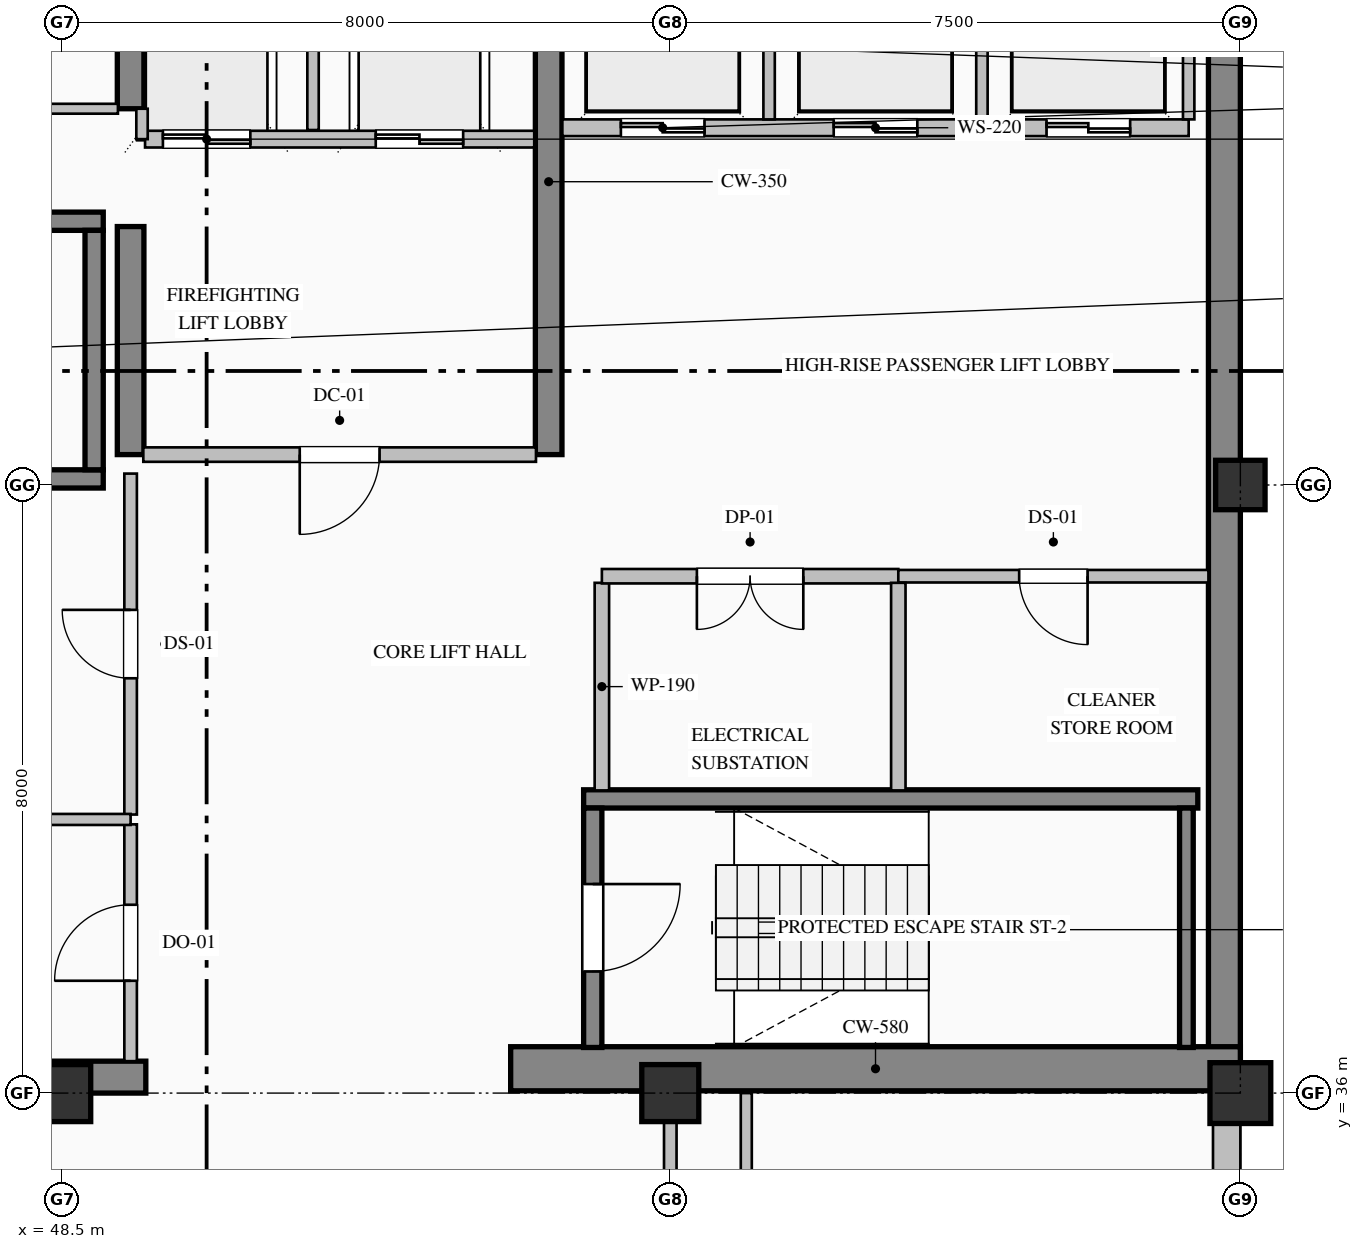
"""IFC4 building model, lengths in metres.
Left out: names, types, materials, properties, quantities, classifications, styles, units other than length and angle.
Written with IfcOpenShell. Run it as: python <this file> out.ifc"""

import sys

from ifc_helpers import new_model, si_unit, direction, frame, frame_2d, origin, origin_2d, place, context, subcontext, project, spatial, rectangle, hollow_rectangle, extrude, element, fill, save


model = new_model("IFC4")
c1 = context("Model", 3, precision=1e-05, world=origin(), true_north=direction((0.0, 1.0)))
c2 = subcontext(c1, "Body", "Model", "MODEL_VIEW")
j1 = project(units=[si_unit("LENGTHUNIT", "METRE"), si_unit("PLANEANGLEUNIT", "RADIAN")], contexts=[c1])
p1 = place(None, origin())
s1 = spatial("IfcSite", under=j1, at=p1, CompositionType="ELEMENT")
p2 = place(p1, origin())
s2 = spatial("IfcBuilding", under=s1, at=p2, CompositionType="ELEMENT")
p3 = place(p2, frame((0.0, 0.0, 331.2)))
s3 = spatial("IfcBuildingStorey", under=s2, at=p3, CompositionType="ELEMENT", Elevation=331.2)
p4 = place(p3, frame((63.79, 36.32, 0.0), z_axis=(0.0, 0.0, 1.0), x_axis=(0.0, 1.0, 0.0)))
e1 = element("IfcWall", 1, at=p4, inside=s3, PredefinedType="SHEAR", context=c2, shape_type="SweptSolid", body=[
    extrude(rectangle(XDim=15.26, YDim=0.42, at=frame_2d((7.63, 0.0))), origin(), (0.0, 0.0, 1.0), 3.785),
])
p5 = place(p3, frame((40.5, 36.21, 0.0), z_axis=(0.0, 0.0, 1.0), x_axis=(1.0, 0.0, 0.0)))
e2 = element("IfcWall", 2, at=p5, inside=s3, PredefinedType="SHEAR", context=c2, shape_type="SweptSolid", body=[
    extrude(rectangle(XDim=9.1, YDim=0.42, at=frame_2d((4.55, 0.0))), origin(), (0.0, 0.0, 1.0), 3.785),
])
p6 = place(p3, frame((54.4, 36.32, 0.0), z_axis=(0.0, 0.0, 1.0), x_axis=(1.0, 0.0, 0.0)))
e3 = element("IfcWall", 3, at=p6, inside=s3, PredefinedType="SHEAR", context=c2, shape_type="SweptSolid", body=[
    extrude(rectangle(XDim=9.6, YDim=0.58, at=frame_2d((4.8, 0.0))), origin(), (0.0, 0.0, 1.0), 4.0),
])
p7 = place(p3, frame((49.4, 44.4, 0.0), z_axis=(0.0, 0.0, 1.0), x_axis=(0.0, 1.0, 0.0)))
e4 = element("IfcWall", 4, at=p7, inside=s3, PredefinedType="SHEAR", context=c2, shape_type="SweptSolid", body=[
    extrude(rectangle(XDim=3.0, YDim=0.35, at=frame_2d((1.5, 0.0))), origin(), (0.0, 0.0, 1.0), 3.785),
])
p8 = place(p3, frame((49.4, 48.95, 0.0), z_axis=(0.0, 0.0, 1.0), x_axis=(0.0, 1.0, 0.0)))
e5 = element("IfcWall", 5, at=p8, inside=s3, PredefinedType="SHEAR", context=c2, shape_type="SweptSolid", body=[
    extrude(rectangle(XDim=2.63, YDim=0.35, at=frame_2d((1.315, 0.0))), origin(), (0.0, 0.0, 1.0), 3.785),
])
p9 = place(p3, frame((54.9, 44.4, 0.0), z_axis=(0.0, 0.0, 1.0), x_axis=(0.0, 1.0, 0.0)))
e6 = element("IfcWall", 6, at=p9, inside=s3, PredefinedType="SHEAR", context=c2, shape_type="SweptSolid", body=[
    extrude(rectangle(XDim=7.18, YDim=0.35, at=frame_2d((3.59, 0.0))), origin(), (0.0, 0.0, 1.0), 3.785),
])
for number, where, z_axis, x_axis in (
    (7, (48.5, 36.0, 0.0), (0.0, 0.0, 1.0), (1.0, 0.0, 0.0)),
    (8, (56.5, 36.0, 0.0), (0.0, 0.0, 1.0), (1.0, 0.0, 0.0)),
):
    element("IfcColumn", number, at=place(p3, frame(where, z_axis=z_axis, x_axis=x_axis)), inside=s3, PredefinedType="COLUMN", context=c2, shape_type="SweptSolid", body=[
        extrude(rectangle(XDim=0.75, YDim=0.75, at=origin_2d()), origin(), (0.0, 0.0, 1.0), 4.0),
    ])
p10 = place(p3, frame((64.0, 36.0, 0.0), z_axis=(0.0, 0.0, 1.0), x_axis=(1.0, 0.0, 0.0)))
e9 = element("IfcColumn", 9, at=p10, inside=s3, PredefinedType="COLUMN", context=c2, shape_type="SweptSolid", body=[
    extrude(hollow_rectangle(XDim=0.8, YDim=0.8, WallThickness=0.032, at=origin_2d()), origin(), (0.0, 0.0, 1.0), 4.0),
])
p11 = place(p3, frame((64.0, 44.0, 0.0), z_axis=(0.0, 0.0, 1.0), x_axis=(1.0, 0.0, 0.0)))
e10 = element("IfcColumn", 10, at=p11, inside=s3, PredefinedType="COLUMN", context=c2, shape_type="SweptSolid", body=[
    extrude(hollow_rectangle(XDim=0.65, YDim=0.65, WallThickness=0.028, at=origin_2d()), origin(), (0.0, 0.0, 1.0), 4.0),
])
p12 = place(p3, frame((63.82, 36.05, 0.0), z_axis=(0.0, 0.0, 1.0), x_axis=(0.0, -1.0, 0.0)))
e11 = element("IfcWall", 11, at=p12, inside=s3, PredefinedType="SOLIDWALL", context=c2, shape_type="SweptSolid", body=[
    extrude(rectangle(XDim=13.55, YDim=0.36, at=frame_2d((6.775, 0.0))), origin(), (0.0, 0.0, 1.0), 3.335),
])
p13 = place(p12, frame((2.925, 0.0, 0.9)))
e12 = element("IfcOpeningElement", 12, at=p13, cuts=e11, PredefinedType="OPENING", context=c2, shape_type="SweptSolid", body=[
    extrude(rectangle(XDim=1.35, YDim=1.85, at=frame_2d((0.675, 0.925))), frame((0.0, 0.19, 0.0), z_axis=(0.0, -1.0, 0.0), x_axis=(1.0, 0.0, 0.0)), (0.0, 0.0, 1.0), 0.38),
])
for number, where, z_axis, x_axis in (
    (13, (40.96, 47.47, 0.0), (0.0, 0.0, 1.0), (1.0, 0.0, 0.0)),
    (14, (49.04, 44.08, 0.0), (0.0, 0.0, 1.0), (-1.0, 0.0, 0.0)),
):
    element("IfcWall", number, at=place(p3, frame(where, z_axis=z_axis, x_axis=x_axis)), inside=s3, PredefinedType="SOLIDWALL", context=c2, shape_type="SweptSolid", body=[
        extrude(rectangle(XDim=8.08, YDim=0.24, at=frame_2d((4.04, 0.0))), origin(), (0.0, 0.0, 1.0), 4.0),
    ])
p14 = place(p3, frame((48.92, 44.2, 0.0), z_axis=(0.0, 0.0, 1.0), x_axis=(0.0, 1.0, 0.0)))
e15 = element("IfcWall", 15, at=p14, inside=s3, PredefinedType="SOLIDWALL", context=c2, shape_type="SweptSolid", body=[
    extrude(rectangle(XDim=3.15, YDim=0.24, at=frame_2d((1.575, 0.0))), origin(), (0.0, 0.0, 1.0), 4.0),
])
p15 = place(p3, frame((55.36, 39.87, 0.0), z_axis=(0.0, 0.0, 1.0), x_axis=(1.0, 0.0, 0.0)))
e16 = element("IfcWall", 16, at=p15, inside=s3, PredefinedType="SOLIDWALL", context=c2, shape_type="SweptSolid", body=[
    extrude(rectangle(XDim=8.08, YDim=0.24, at=frame_2d((4.04, 0.0))), origin(), (0.0, 0.0, 1.0), 4.0),
])
p16 = place(p3, frame((55.48, 39.75, 0.0), z_axis=(0.0, 0.0, 1.0), x_axis=(0.0, -1.0, 0.0)))
e17 = element("IfcWall", 17, at=p16, inside=s3, PredefinedType="SOLIDWALL", context=c2, shape_type="SweptSolid", body=[
    extrude(rectangle(XDim=3.15, YDim=0.24, at=frame_2d((1.575, 0.0))), origin(), (0.0, 0.0, 1.0), 4.0),
])
p17 = place(p16, frame((1.0, 0.0, 0.0)))
e18 = element("IfcOpeningElement", 18, at=p17, cuts=e17, PredefinedType="OPENING", context=c2, shape_type="SweptSolid", body=[
    extrude(rectangle(XDim=1.15, YDim=2.2, at=frame_2d((0.575, 1.1))), frame((0.0, 0.13, 0.0), z_axis=(0.0, -1.0, 0.0), x_axis=(1.0, 0.0, 0.0)), (0.0, 0.0, 1.0), 0.26),
])
p18 = place(p3, frame((63.29, 36.6, 0.0), z_axis=(0.0, 0.0, 1.0), x_axis=(0.0, 1.0, 0.0)))
e19 = element("IfcWall", 19, at=p18, inside=s3, PredefinedType="SOLIDWALL", context=c2, shape_type="SweptSolid", body=[
    extrude(rectangle(XDim=3.15, YDim=0.18, at=frame_2d((1.575, 0.0))), origin(), (0.0, 0.0, 1.0), 4.0),
])
p19 = place(p3, frame((54.71, 48.55, 0.0), z_axis=(0.0, 0.0, 1.0), x_axis=(-1.0, 0.0, 0.0)))
e20 = element("IfcWall", 20, at=p19, inside=s3, PredefinedType="PARTITIONING", context=c2, shape_type="SweptSolid", body=[
    extrude(rectangle(XDim=5.12, YDim=0.22, at=frame_2d((2.56, 0.0))), origin(), (0.0, 0.0, 1.0), 3.785),
])
p20 = place(p19, frame((3.735, 0.0, 0.0)))
e21 = element("IfcOpeningElement", 21, at=p20, cuts=e20, PredefinedType="OPENING", context=c2, shape_type="SweptSolid", body=[
    extrude(rectangle(XDim=1.15, YDim=2.2, at=frame_2d((0.575, 1.1))), frame((0.0, 0.12, 0.0), z_axis=(0.0, -1.0, 0.0), x_axis=(1.0, 0.0, 0.0)), (0.0, 0.0, 1.0), 0.24),
])
p21 = place(p19, frame((0.935, 0.0, 0.0)))
e22 = element("IfcOpeningElement", 22, at=p21, cuts=e20, PredefinedType="OPENING", context=c2, shape_type="SweptSolid", body=[
    extrude(rectangle(XDim=1.15, YDim=2.2, at=frame_2d((0.575, 1.1))), frame((0.0, 0.12, 0.0), z_axis=(0.0, -1.0, 0.0), x_axis=(1.0, 0.0, 0.0)), (0.0, 0.0, 1.0), 0.24),
])
p22 = place(p3, frame((51.8, 48.67, 0.0), z_axis=(0.0, 0.0, 1.0), x_axis=(0.0, 1.0, 0.0)))
e23 = element("IfcWall", 23, at=p22, inside=s3, PredefinedType="PARTITIONING", context=c2, shape_type="SweptSolid", body=[
    extrude(rectangle(XDim=2.91, YDim=0.15, at=frame_2d((1.455, 0.0))), origin(), (0.0, 0.0, 1.0), 3.785),
])
p23 = place(p3, frame((49.55, 48.55, 0.0), z_axis=(0.0, 0.0, 1.0), x_axis=(0.0, 1.0, 0.0)))
e24 = element("IfcWall", 24, at=p23, inside=s3, PredefinedType="PARTITIONING", context=c2, shape_type="SweptSolid", body=[
    extrude(rectangle(XDim=0.4, YDim=0.15, at=frame_2d((0.2, 0.0))), origin(), (0.0, 0.0, 1.0), 3.785),
])
p24 = place(p3, frame((63.32, 48.7, 0.0), z_axis=(0.0, 0.0, 1.0), x_axis=(-1.0, 0.0, 0.0)))
e25 = element("IfcWall", 25, at=p24, inside=s3, PredefinedType="PARTITIONING", context=c2, shape_type="SweptSolid", body=[
    extrude(rectangle(XDim=8.24, YDim=0.22, at=frame_2d((4.12, 0.0))), origin(), (0.0, 0.0, 1.0), 3.785),
])
p25 = place(p24, frame((6.37, 0.0, 0.0)))
e26 = element("IfcOpeningElement", 26, at=p25, cuts=e25, PredefinedType="OPENING", context=c2, shape_type="SweptSolid", body=[
    extrude(rectangle(XDim=1.1, YDim=2.2, at=frame_2d((0.55, 1.1))), frame((0.0, 0.12, 0.0), z_axis=(0.0, -1.0, 0.0), x_axis=(1.0, 0.0, 0.0)), (0.0, 0.0, 1.0), 0.24),
])
p26 = place(p24, frame((3.57, 0.0, 0.0)))
e27 = element("IfcOpeningElement", 27, at=p26, cuts=e25, PredefinedType="OPENING", context=c2, shape_type="SweptSolid", body=[
    extrude(rectangle(XDim=1.1, YDim=2.2, at=frame_2d((0.55, 1.1))), frame((0.0, 0.12, 0.0), z_axis=(0.0, -1.0, 0.0), x_axis=(1.0, 0.0, 0.0)), (0.0, 0.0, 1.0), 0.24),
])
p27 = place(p24, frame((0.77, 0.0, 0.0)))
e28 = element("IfcOpeningElement", 28, at=p27, cuts=e25, PredefinedType="OPENING", context=c2, shape_type="SweptSolid", body=[
    extrude(rectangle(XDim=1.1, YDim=2.2, at=frame_2d((0.55, 1.1))), frame((0.0, 0.12, 0.0), z_axis=(0.0, -1.0, 0.0), x_axis=(1.0, 0.0, 0.0)), (0.0, 0.0, 1.0), 0.24),
])
for number, where, z_axis, x_axis in (
    (29, (57.8, 48.81, 0.0), (0.0, 0.0, 1.0), (0.0, 1.0, 0.0)),
    (30, (60.6, 48.81, 0.0), (0.0, 0.0, 1.0), (0.0, 1.0, 0.0)),
    (31, (63.32, 48.81, 0.0), (0.0, 0.0, 1.0), (0.0, 1.0, 0.0)),
):
    element("IfcWall", number, at=place(p3, frame(where, z_axis=z_axis, x_axis=x_axis)), inside=s3, PredefinedType="PARTITIONING", context=c2, shape_type="SweptSolid", body=[
        extrude(rectangle(XDim=2.77, YDim=0.15, at=frame_2d((1.385, 0.0))), origin(), (0.0, 0.0, 1.0), 3.785),
    ])
p28 = place(p3, frame((45.2, 48.95, 0.0), z_axis=(0.0, 0.0, 1.0), x_axis=(1.0, 0.0, 0.0)))
e32 = element("IfcWall", 32, at=p28, inside=s3, PredefinedType="PARTITIONING", context=c2, shape_type="SweptSolid", body=[
    extrude(rectangle(XDim=4.033, YDim=0.13, at=frame_2d((2.017, 0.0))), origin(), (0.0, 0.0, 1.0), 3.785),
])
p29 = place(p28, frame((1.556, 0.0, 0.0)))
e33 = element("IfcOpeningElement", 33, at=p29, cuts=e32, PredefinedType="OPENING", context=c2, shape_type="SweptSolid", body=[
    extrude(rectangle(XDim=0.92, YDim=2.15, at=frame_2d((0.46, 1.075))), frame((0.0, 0.075, 0.0), z_axis=(0.0, -1.0, 0.0), x_axis=(1.0, 0.0, 0.0)), (0.0, 0.0, 1.0), 0.15),
])
p30 = place(p3, frame((54.733, 44.4, 0.0), z_axis=(0.0, 0.0, 1.0), x_axis=(-1.0, 0.0, 0.0)))
e34 = element("IfcWall", 34, at=p30, inside=s3, PredefinedType="PARTITIONING", context=c2, shape_type="SweptSolid", body=[
    extrude(rectangle(XDim=5.166, YDim=0.19, at=frame_2d((2.583, 0.0))), origin(), (0.0, 0.0, 1.0), 3.785),
])
p31 = place(p30, frame((2.058, 0.0, 0.0)))
e35 = element("IfcOpeningElement", 35, at=p31, cuts=e34, PredefinedType="OPENING", context=c2, shape_type="SweptSolid", body=[
    extrude(rectangle(XDim=1.05, YDim=2.15, at=frame_2d((0.525, 1.075))), frame((0.0, 0.105, 0.0), z_axis=(0.0, -1.0, 0.0), x_axis=(1.0, 0.0, 0.0)), (0.0, 0.0, 1.0), 0.21),
])
p32 = place(p3, frame((49.4, 36.42, 0.0), z_axis=(0.0, 0.0, 1.0), x_axis=(0.0, 1.0, 0.0)))
e36 = element("IfcWall", 36, at=p32, inside=s3, PredefinedType="PARTITIONING", context=c2, shape_type="SweptSolid", body=[
    extrude(rectangle(XDim=3.115, YDim=0.165, at=frame_2d((1.558, 0.0))), origin(), (0.0, 0.0, 1.0), 3.027),
])
p33 = place(p32, frame((1.058, 0.0, 0.0)))
e37 = element("IfcOpeningElement", 37, at=p33, cuts=e36, PredefinedType="OPENING", context=c2, shape_type="SweptSolid", body=[
    extrude(rectangle(XDim=1.0, YDim=2.15, at=frame_2d((0.5, 1.075))), frame((0.0, 0.093, 0.0), z_axis=(0.0, -1.0, 0.0), x_axis=(1.0, 0.0, 0.0)), (0.0, 0.0, 1.0), 0.185),
])
p34 = place(p3, frame((49.4, 39.665, 0.0), z_axis=(0.0, 0.0, 1.0), x_axis=(0.0, 1.0, 0.0)))
e38 = element("IfcWall", 38, at=p34, inside=s3, PredefinedType="PARTITIONING", context=c2, shape_type="SweptSolid", body=[
    extrude(rectangle(XDim=4.485, YDim=0.165, at=frame_2d((2.243, 0.0))), origin(), (0.0, 0.0, 1.0), 3.027),
])
p35 = place(p34, frame((1.793, 0.0, 0.0)))
e39 = element("IfcOpeningElement", 39, at=p35, cuts=e38, PredefinedType="OPENING", context=c2, shape_type="SweptSolid", body=[
    extrude(rectangle(XDim=0.9, YDim=2.15, at=frame_2d((0.45, 1.075))), frame((0.0, 0.093, 0.0), z_axis=(0.0, -1.0, 0.0), x_axis=(1.0, 0.0, 0.0)), (0.0, 0.0, 1.0), 0.185),
])
p36 = place(p3, frame((55.6, 42.713, 0.0), z_axis=(0.0, 0.0, 1.0), x_axis=(0.0, -1.0, 0.0)))
e40 = element("IfcWall", 40, at=p36, inside=s3, PredefinedType="PARTITIONING", context=c2, shape_type="SweptSolid", body=[
    extrude(rectangle(XDim=2.731, YDim=0.19, at=frame_2d((1.365, 0.0))), origin(), (0.0, 0.0, 1.0), 3.785),
])
p37 = place(p3, frame((40.92, 39.6, 0.0), z_axis=(0.0, 0.0, 1.0), x_axis=(1.0, 0.0, 0.0)))
e41 = element("IfcWall", 41, at=p37, inside=s3, PredefinedType="PARTITIONING", context=c2, shape_type="SweptSolid", body=[
    extrude(rectangle(XDim=8.48, YDim=0.145, at=frame_2d((4.24, 0.0))), origin(), (0.0, 0.0, 1.0), 3.785),
])
p38 = place(p3, frame((59.5, 42.8, 0.0), z_axis=(0.0, 0.0, 1.0), x_axis=(-1.0, 0.0, 0.0)))
e42 = element("IfcWall", 42, at=p38, inside=s3, PredefinedType="PARTITIONING", context=c2, shape_type="SweptSolid", body=[
    extrude(rectangle(XDim=3.9, YDim=0.19, at=frame_2d((1.95, 0.0))), origin(), (0.0, 0.0, 1.0), 3.785),
])
p39 = place(p38, frame((1.25, 0.0, 0.0)))
e43 = element("IfcOpeningElement", 43, at=p39, cuts=e42, PredefinedType="OPENING", context=c2, shape_type="SweptSolid", body=[
    extrude(rectangle(XDim=1.4, YDim=2.25, at=frame_2d((0.7, 1.125))), frame((0.0, 0.105, 0.0), z_axis=(0.0, -1.0, 0.0), x_axis=(1.0, 0.0, 0.0)), (0.0, 0.0, 1.0), 0.21),
])
p40 = place(p3, frame((63.58, 42.8, 0.0), z_axis=(0.0, 0.0, 1.0), x_axis=(-1.0, 0.0, 0.0)))
e44 = element("IfcWall", 44, at=p40, inside=s3, PredefinedType="PARTITIONING", context=c2, shape_type="SweptSolid", body=[
    extrude(rectangle(XDim=4.08, YDim=0.165, at=frame_2d((2.04, 0.0))), origin(), (0.0, 0.0, 1.0), 3.785),
])
p41 = place(p40, frame((1.59, 0.0, 0.0)))
e45 = element("IfcOpeningElement", 45, at=p41, cuts=e44, PredefinedType="OPENING", context=c2, shape_type="SweptSolid", body=[
    extrude(rectangle(XDim=0.9, YDim=2.15, at=frame_2d((0.45, 1.075))), frame((0.0, 0.093, 0.0), z_axis=(0.0, -1.0, 0.0), x_axis=(1.0, 0.0, 0.0)), (0.0, 0.0, 1.0), 0.185),
])
p42 = place(p3, frame((59.5, 42.713, 0.0), z_axis=(0.0, 0.0, 1.0), x_axis=(0.0, -1.0, 0.0)))
e46 = element("IfcWall", 46, at=p42, inside=s3, PredefinedType="PARTITIONING", context=c2, shape_type="SweptSolid", body=[
    extrude(rectangle(XDim=2.731, YDim=0.19, at=frame_2d((1.365, 0.0))), origin(), (0.0, 0.0, 1.0), 3.785),
])
p43 = place(p3, frame((56.5, 36.0, 0.0), z_axis=(0.0, 0.0, 1.0), x_axis=(0.0, -1.0, 0.0)))
e47 = element("IfcWall", 47, at=p43, inside=s3, PredefinedType="PARTITIONING", context=c2, shape_type="SweptSolid", body=[
    extrude(rectangle(XDim=2.325, YDim=0.165, at=frame_2d((1.163, 0.0))), origin(), (0.0, 0.0, 1.0), 3.177),
])
p44 = place(p3, frame((57.5, 36.0, 0.0), z_axis=(0.0, 0.0, 1.0), x_axis=(0.0, -1.0, 0.0)))
e48 = element("IfcWall", 48, at=p44, inside=s3, PredefinedType="PARTITIONING", context=c2, shape_type="SweptSolid", body=[
    extrude(rectangle(XDim=10.926, YDim=0.145, at=frame_2d((5.463, 0.0))), origin(), (0.0, 0.0, 1.0), 3.785),
])
p45 = place(p17, origin())
e49 = element("IfcDoor", 49, at=p45, inside=s3, OperationType="SINGLE_SWING_LEFT", PredefinedType="DOOR", context=c2, shape_type="SweptSolid", body=[
    extrude(rectangle(XDim=1.15, YDim=2.2, at=frame_2d((0.575, 1.1))), frame((0.0, 0.025, 0.0), z_axis=(0.0, -1.0, 0.0), x_axis=(1.0, 0.0, 0.0)), (0.0, 0.0, 1.0), 0.05),
])
fill(e18, e49)
p46 = place(p20, origin())
e50 = element("IfcDoor", 50, at=p46, inside=s3, OperationType="DOUBLE_DOOR_SLIDING", PredefinedType="DOOR", context=c2, shape_type="SweptSolid", body=[
    extrude(rectangle(XDim=1.15, YDim=2.2, at=frame_2d((0.575, 1.1))), frame((0.0, 0.025, 0.0), z_axis=(0.0, -1.0, 0.0), x_axis=(1.0, 0.0, 0.0)), (0.0, 0.0, 1.0), 0.05),
])
fill(e21, e50)
p47 = place(p21, origin())
e51 = element("IfcDoor", 51, at=p47, inside=s3, OperationType="DOUBLE_DOOR_SLIDING", PredefinedType="DOOR", context=c2, shape_type="SweptSolid", body=[
    extrude(rectangle(XDim=1.15, YDim=2.2, at=frame_2d((0.575, 1.1))), frame((0.0, 0.025, 0.0), z_axis=(0.0, -1.0, 0.0), x_axis=(1.0, 0.0, 0.0)), (0.0, 0.0, 1.0), 0.05),
])
fill(e22, e51)
p48 = place(p25, origin())
e52 = element("IfcDoor", 52, at=p48, inside=s3, OperationType="DOUBLE_DOOR_SLIDING", PredefinedType="DOOR", context=c2, shape_type="SweptSolid", body=[
    extrude(rectangle(XDim=1.1, YDim=2.2, at=frame_2d((0.55, 1.1))), frame((0.0, 0.025, 0.0), z_axis=(0.0, -1.0, 0.0), x_axis=(1.0, 0.0, 0.0)), (0.0, 0.0, 1.0), 0.05),
])
fill(e26, e52)
p49 = place(p26, origin())
e53 = element("IfcDoor", 53, at=p49, inside=s3, OperationType="DOUBLE_DOOR_SLIDING", PredefinedType="DOOR", context=c2, shape_type="SweptSolid", body=[
    extrude(rectangle(XDim=1.1, YDim=2.2, at=frame_2d((0.55, 1.1))), frame((0.0, 0.025, 0.0), z_axis=(0.0, -1.0, 0.0), x_axis=(1.0, 0.0, 0.0)), (0.0, 0.0, 1.0), 0.05),
])
fill(e27, e53)
p50 = place(p27, origin())
e54 = element("IfcDoor", 54, at=p50, inside=s3, OperationType="DOUBLE_DOOR_SLIDING", PredefinedType="DOOR", context=c2, shape_type="SweptSolid", body=[
    extrude(rectangle(XDim=1.1, YDim=2.2, at=frame_2d((0.55, 1.1))), frame((0.0, 0.025, 0.0), z_axis=(0.0, -1.0, 0.0), x_axis=(1.0, 0.0, 0.0)), (0.0, 0.0, 1.0), 0.05),
])
fill(e28, e54)
p51 = place(p31, origin())
e55 = element("IfcDoor", 55, at=p51, inside=s3, OperationType="SINGLE_SWING_RIGHT", PredefinedType="DOOR", context=c2, shape_type="SweptSolid", body=[
    extrude(rectangle(XDim=1.05, YDim=2.15, at=frame_2d((0.525, 1.075))), frame((0.0, 0.025, 0.0), z_axis=(0.0, -1.0, 0.0), x_axis=(1.0, 0.0, 0.0)), (0.0, 0.0, 1.0), 0.05),
])
fill(e35, e55)
p52 = place(p33, origin())
e56 = element("IfcDoor", 56, at=p52, inside=s3, OperationType="SINGLE_SWING_LEFT", PredefinedType="DOOR", context=c2, shape_type="SweptSolid", body=[
    extrude(rectangle(XDim=1.0, YDim=2.15, at=frame_2d((0.5, 1.075))), frame((0.0, 0.025, 0.0), z_axis=(0.0, -1.0, 0.0), x_axis=(1.0, 0.0, 0.0)), (0.0, 0.0, 1.0), 0.05),
])
fill(e37, e56)
p53 = place(p35, origin())
e57 = element("IfcDoor", 57, at=p53, inside=s3, OperationType="SINGLE_SWING_RIGHT", PredefinedType="DOOR", context=c2, shape_type="SweptSolid", body=[
    extrude(rectangle(XDim=0.9, YDim=2.15, at=frame_2d((0.45, 1.075))), frame((0.0, 0.025, 0.0), z_axis=(0.0, -1.0, 0.0), x_axis=(1.0, 0.0, 0.0)), (0.0, 0.0, 1.0), 0.05),
])
fill(e39, e57)
p54 = place(p39, origin())
e58 = element("IfcDoor", 58, at=p54, inside=s3, OperationType="DOUBLE_DOOR_SINGLE_SWING", PredefinedType="DOOR", context=c2, shape_type="SweptSolid", body=[
    extrude(rectangle(XDim=1.4, YDim=2.25, at=frame_2d((0.7, 1.125))), frame((0.0, 0.025, 0.0), z_axis=(0.0, -1.0, 0.0), x_axis=(1.0, 0.0, 0.0)), (0.0, 0.0, 1.0), 0.05),
])
fill(e43, e58)
p55 = place(p41, origin())
e59 = element("IfcDoor", 59, at=p55, inside=s3, OperationType="SINGLE_SWING_LEFT", PredefinedType="DOOR", context=c2, shape_type="SweptSolid", body=[
    extrude(rectangle(XDim=0.9, YDim=2.15, at=frame_2d((0.45, 1.075))), frame((0.0, 0.025, 0.0), z_axis=(0.0, -1.0, 0.0), x_axis=(1.0, 0.0, 0.0)), (0.0, 0.0, 1.0), 0.05),
])
fill(e45, e59)
save(model, sys.argv[1])
